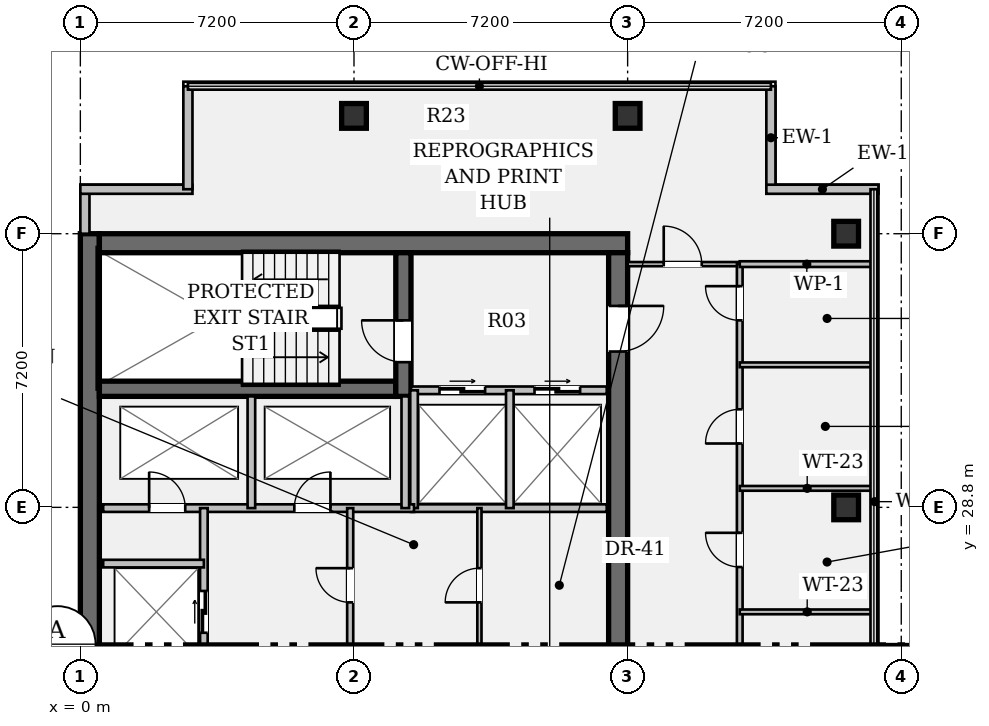
"""IFC4 building model, lengths in metres.
Left out: names, types, materials, properties, quantities, classifications, styles, units other than length and angle.
Written with IfcOpenShell. Run it as: python <this file> out.ifc"""

import sys

from ifc_helpers import new_model, si_unit, direction, frame, frame_2d, origin, origin_2d, place, context, subcontext, project, spatial, rectangle, hollow_rectangle, extrude, element, fill, save


model = new_model("IFC4")
c1 = context("Model", 3, precision=1e-05, world=origin(), true_north=direction((0.0, 1.0)))
c2 = subcontext(c1, "Body", "Model", "MODEL_VIEW")
j1 = project(units=[si_unit("LENGTHUNIT", "METRE"), si_unit("PLANEANGLEUNIT", "RADIAN")], contexts=[c1])
p1 = place(None, origin())
s1 = spatial("IfcSite", under=j1, at=p1, CompositionType="ELEMENT")
p2 = place(p1, origin())
s2 = spatial("IfcBuilding", under=s1, at=p2, CompositionType="ELEMENT")
p3 = place(p2, frame((0.0, 0.0, 286.65)))
s3 = spatial("IfcBuildingStorey", under=s2, at=p3, CompositionType="ELEMENT", Elevation=286.65)
p4 = place(p3, frame((0.25, 7.2, 0.0), z_axis=(0.0, 0.0, 1.0), x_axis=(0.0, 1.0, 0.0)))
e1 = element("IfcWall", 1, at=p4, inside=s3, PredefinedType="SHEAR", context=c2, shape_type="SweptSolid", body=[
    extrude(rectangle(XDim=28.8, YDim=0.5, at=frame_2d((14.4, 0.0))), origin(), (0.0, 0.0, 1.0), 3.24),
])
p5 = place(p3, frame((0.5, 35.75, 0.0), z_axis=(0.0, 0.0, 1.0), x_axis=(1.0, 0.0, 0.0)))
e2 = element("IfcWall", 2, at=p5, inside=s3, PredefinedType="SHEAR", context=c2, shape_type="SweptSolid", body=[
    extrude(rectangle(XDim=13.9, YDim=0.5, at=frame_2d((6.95, 0.0))), origin(), (0.0, 0.0, 1.0), 3.24),
])
p6 = place(p3, frame((14.15, 35.5, 0.0), z_axis=(0.0, 0.0, 1.0), x_axis=(0.0, -1.0, 0.0)))
e3 = element("IfcWall", 3, at=p6, inside=s3, PredefinedType="SHEAR", context=c2, shape_type="SweptSolid", body=[
    extrude(rectangle(XDim=27.8, YDim=0.5, at=frame_2d((13.9, 0.0))), origin(), (0.0, 0.0, 1.0), 3.24),
])
p7 = place(p6, frame((1.4, 0.0, 0.0)))
e4 = element("IfcOpeningElement", 4, at=p7, cuts=e3, PredefinedType="OPENING", context=c2, shape_type="SweptSolid", body=[
    extrude(rectangle(XDim=1.2, YDim=2.15, at=frame_2d((0.6, 1.075))), frame((0.0, 0.262, 0.0), z_axis=(0.0, -1.0, 0.0), x_axis=(1.0, 0.0, 0.0)), (0.0, 0.0, 1.0), 0.524),
])
p8 = place(p6, frame((25.35, 0.0, 0.0)))
e5 = element("IfcOpeningElement", 5, at=p8, cuts=e3, PredefinedType="OPENING", context=c2, shape_type="SweptSolid", body=[
    extrude(rectangle(XDim=1.2, YDim=2.15, at=frame_2d((0.6, 1.075))), frame((0.0, 0.262, 0.0), z_axis=(0.0, -1.0, 0.0), x_axis=(1.0, 0.0, 0.0)), (0.0, 0.0, 1.0), 0.524),
])
p9 = place(p6, frame((14.7, 0.0, 0.0)))
e6 = element("IfcOpeningElement", 6, at=p9, cuts=e3, PredefinedType="OPENING", context=c2, shape_type="SweptSolid", body=[
    extrude(rectangle(XDim=1.6, YDim=2.2, at=frame_2d((0.8, 1.1))), frame((0.0, 0.262, 0.0), z_axis=(0.0, -1.0, 0.0), x_axis=(1.0, 0.0, 0.0)), (0.0, 0.0, 1.0), 0.524),
])
p10 = place(p3, frame((0.5, 31.92, 0.0), z_axis=(0.0, 0.0, 1.0), x_axis=(1.0, 0.0, 0.0)))
e7 = element("IfcWall", 7, at=p10, inside=s3, PredefinedType="SHEAR", context=c2, shape_type="SweptSolid", body=[
    extrude(rectangle(XDim=7.8, YDim=0.4, at=frame_2d((3.9, 0.0))), origin(), (0.0, 0.0, 1.0), 3.24),
])
p11 = place(p3, frame((8.5, 31.72, 0.0), z_axis=(0.0, 0.0, 1.0), x_axis=(0.0, 1.0, 0.0)))
e8 = element("IfcWall", 8, at=p11, inside=s3, PredefinedType="SHEAR", context=c2, shape_type="SweptSolid", body=[
    extrude(rectangle(XDim=3.78, YDim=0.4, at=frame_2d((1.89, 0.0))), origin(), (0.0, 0.0, 1.0), 3.24),
])
p12 = place(p11, frame((0.9, 0.0, 0.0)))
e9 = element("IfcOpeningElement", 9, at=p12, cuts=e8, PredefinedType="OPENING", context=c2, shape_type="SweptSolid", body=[
    extrude(rectangle(XDim=1.1, YDim=2.15, at=frame_2d((0.55, 1.075))), frame((0.0, 0.212, 0.0), z_axis=(0.0, -1.0, 0.0), x_axis=(1.0, 0.0, 0.0)), (0.0, 0.0, 1.0), 0.424),
])
for number, where, z_axis, x_axis in (
    (10, (7.2, 39.1, 0.0), (0.0, 0.0, 1.0), (1.0, 0.0, 0.0)),
    (11, (14.4, 39.1, 0.0), (0.0, 0.0, 1.0), (1.0, 0.0, 0.0)),
    (12, (20.15, 28.8, 0.0), (0.0, 0.0, 1.0), (1.0, 0.0, 0.0)),
    (13, (20.15, 36.0, 0.0), (0.0, 0.0, 1.0), (1.0, 0.0, 0.0)),
):
    element("IfcColumn", number, at=place(p3, frame(where, z_axis=z_axis, x_axis=x_axis)), inside=s3, PredefinedType="COLUMN", context=c2, shape_type="SweptSolid", body=[
        extrude(hollow_rectangle(XDim=0.65, YDim=0.65, WallThickness=0.04, at=origin_2d()), origin(), (0.0, 0.0, 1.0), 3.24),
    ])
p13 = place(p3, frame((0.12, 36.0, 0.0), z_axis=(0.0, 0.0, 1.0), x_axis=(0.0, 1.0, 0.0)))
e14 = element("IfcWall", 14, at=p13, inside=s3, PredefinedType="STANDARD", context=c2, shape_type="SweptSolid", body=[
    extrude(rectangle(XDim=1.17, YDim=0.24, at=frame_2d((0.585, 0.0))), origin(), (0.0, 0.0, 1.0), 3.24),
])
p14 = place(p3, frame((0.0, 37.17, 0.0), z_axis=(0.0, 0.0, 1.0), x_axis=(1.0, 0.0, 0.0)))
e15 = element("IfcWall", 15, at=p14, inside=s3, PredefinedType="STANDARD", context=c2, shape_type="SweptSolid", body=[
    extrude(rectangle(XDim=2.95, YDim=0.24, at=frame_2d((1.475, 0.0))), origin(), (0.0, 0.0, 1.0), 3.24),
])
for number, where, z_axis, x_axis in (
    (16, (2.83, 37.17, 0.0), (0.0, 0.0, 1.0), (0.0, 1.0, 0.0)),
    (17, (18.17, 39.88, 0.0), (0.0, 0.0, 1.0), (0.0, -1.0, 0.0)),
):
    element("IfcWall", number, at=place(p3, frame(where, z_axis=z_axis, x_axis=x_axis)), inside=s3, PredefinedType="STANDARD", context=c2, shape_type="SweptSolid", body=[
        extrude(rectangle(XDim=2.71, YDim=0.24, at=frame_2d((1.355, 0.0))), origin(), (0.0, 0.0, 1.0), 3.24),
    ])
p15 = place(p3, frame((18.05, 37.17, 0.0), z_axis=(0.0, 0.0, 1.0), x_axis=(1.0, 0.0, 0.0)))
e18 = element("IfcWall", 18, at=p15, inside=s3, PredefinedType="STANDARD", context=c2, shape_type="SweptSolid", body=[
    extrude(rectangle(XDim=2.95, YDim=0.24, at=frame_2d((1.475, 0.0))), origin(), (0.0, 0.0, 1.0), 3.24),
])
p16 = place(p3, frame((8.7, 31.88, 0.0), z_axis=(0.0, 0.0, 1.0), x_axis=(1.0, 0.0, 0.0)))
e19 = element("IfcWall", 19, at=p16, inside=s3, PredefinedType="PARTITIONING", context=c2, shape_type="SweptSolid", body=[
    extrude(rectangle(XDim=5.15, YDim=0.2, at=frame_2d((2.575, 0.0))), origin(), (0.0, 0.0, 1.0), 3.24),
])
p17 = place(p16, frame((0.75, 0.0, 0.0)))
e20 = element("IfcOpeningElement", 20, at=p17, cuts=e19, PredefinedType="OPENING", context=c2, shape_type="SweptSolid", body=[
    extrude(rectangle(XDim=1.2, YDim=2.2, at=frame_2d((0.6, 1.1))), frame((0.0, 0.112, 0.0), z_axis=(0.0, -1.0, 0.0), x_axis=(1.0, 0.0, 0.0)), (0.0, 0.0, 1.0), 0.224),
])
p18 = place(p16, frame((3.25, 0.0, 0.0)))
e21 = element("IfcOpeningElement", 21, at=p18, cuts=e19, PredefinedType="OPENING", context=c2, shape_type="SweptSolid", body=[
    extrude(rectangle(XDim=1.2, YDim=2.2, at=frame_2d((0.6, 1.1))), frame((0.0, 0.112, 0.0), z_axis=(0.0, -1.0, 0.0), x_axis=(1.0, 0.0, 0.0)), (0.0, 0.0, 1.0), 0.224),
])
p19 = place(p3, frame((8.7, 28.78, 0.0), z_axis=(0.0, 0.0, 1.0), x_axis=(1.0, 0.0, 0.0)))
e22 = element("IfcWall", 22, at=p19, inside=s3, PredefinedType="PARTITIONING", context=c2, shape_type="SweptSolid", body=[
    extrude(rectangle(XDim=5.15, YDim=0.2, at=frame_2d((2.575, 0.0))), origin(), (0.0, 0.0, 1.0), 3.24),
])
for number, where, z_axis, x_axis in (
    (23, (8.78, 28.78, 0.0), (0.0, 0.0, 1.0), (0.0, 1.0, 0.0)),
    (24, (11.3, 28.78, 0.0), (0.0, 0.0, 1.0), (0.0, 1.0, 0.0)),
):
    element("IfcWall", number, at=place(p3, frame(where, z_axis=z_axis, x_axis=x_axis)), inside=s3, PredefinedType="PARTITIONING", context=c2, shape_type="SweptSolid", body=[
        extrude(rectangle(XDim=3.1, YDim=0.2, at=frame_2d((1.55, 0.0))), origin(), (0.0, 0.0, 1.0), 3.24),
    ])
p20 = place(p3, frame((0.6, 28.78, 0.0), z_axis=(0.0, 0.0, 1.0), x_axis=(1.0, 0.0, 0.0)))
e25 = element("IfcWall", 25, at=p20, inside=s3, PredefinedType="PARTITIONING", context=c2, shape_type="SweptSolid", body=[
    extrude(rectangle(XDim=8.18, YDim=0.2, at=frame_2d((4.09, 0.0))), origin(), (0.0, 0.0, 1.0), 3.24),
])
p21 = place(p20, frame((1.21, 0.0, 0.0)))
e26 = element("IfcOpeningElement", 26, at=p21, cuts=e25, PredefinedType="OPENING", context=c2, shape_type="SweptSolid", body=[
    extrude(rectangle(XDim=0.95, YDim=2.15, at=frame_2d((0.475, 1.075))), frame((0.0, 0.112, 0.0), z_axis=(0.0, -1.0, 0.0), x_axis=(1.0, 0.0, 0.0)), (0.0, 0.0, 1.0), 0.224),
])
p22 = place(p20, frame((5.03, 0.0, 0.0)))
e27 = element("IfcOpeningElement", 27, at=p22, cuts=e25, PredefinedType="OPENING", context=c2, shape_type="SweptSolid", body=[
    extrude(rectangle(XDim=0.95, YDim=2.15, at=frame_2d((0.475, 1.075))), frame((0.0, 0.112, 0.0), z_axis=(0.0, -1.0, 0.0), x_axis=(1.0, 0.0, 0.0)), (0.0, 0.0, 1.0), 0.224),
])
for number, where, z_axis, x_axis in (
    (28, (4.5, 28.78, 0.0), (0.0, 0.0, 1.0), (0.0, 1.0, 0.0)),
    (29, (8.55, 28.78, 0.0), (0.0, 0.0, 1.0), (0.0, 1.0, 0.0)),
):
    element("IfcWall", number, at=place(p3, frame(where, z_axis=z_axis, x_axis=x_axis)), inside=s3, PredefinedType="PARTITIONING", context=c2, shape_type="SweptSolid", body=[
        extrude(rectangle(XDim=2.94, YDim=0.2, at=frame_2d((1.47, 0.0))), origin(), (0.0, 0.0, 1.0), 3.24),
    ])
p23 = place(p3, frame((3.25, 15.7, 0.0), z_axis=(0.0, 0.0, 1.0), x_axis=(0.0, 1.0, 0.0)))
e30 = element("IfcWall", 30, at=p23, inside=s3, PredefinedType="PARTITIONING", context=c2, shape_type="SweptSolid", body=[
    extrude(rectangle(XDim=13.08, YDim=0.2, at=frame_2d((6.54, 0.0))), origin(), (0.0, 0.0, 1.0), 3.24),
])
p24 = place(p23, frame((0.9, 0.0, 0.0)))
e31 = element("IfcOpeningElement", 31, at=p24, cuts=e30, PredefinedType="OPENING", context=c2, shape_type="SweptSolid", body=[
    extrude(rectangle(XDim=1.1, YDim=2.2, at=frame_2d((0.55, 1.1))), frame((0.0, 0.112, 0.0), z_axis=(0.0, -1.0, 0.0), x_axis=(1.0, 0.0, 0.0)), (0.0, 0.0, 1.0), 0.224),
])
p25 = place(p23, frame((3.5, 0.0, 0.0)))
e32 = element("IfcOpeningElement", 32, at=p25, cuts=e30, PredefinedType="OPENING", context=c2, shape_type="SweptSolid", body=[
    extrude(rectangle(XDim=1.1, YDim=2.2, at=frame_2d((0.55, 1.1))), frame((0.0, 0.112, 0.0), z_axis=(0.0, -1.0, 0.0), x_axis=(1.0, 0.0, 0.0)), (0.0, 0.0, 1.0), 0.224),
])
p26 = place(p23, frame((7.2, 0.0, 0.0)))
e33 = element("IfcOpeningElement", 33, at=p26, cuts=e30, PredefinedType="OPENING", context=c2, shape_type="SweptSolid", body=[
    extrude(rectangle(XDim=1.1, YDim=2.2, at=frame_2d((0.55, 1.1))), frame((0.0, 0.112, 0.0), z_axis=(0.0, -1.0, 0.0), x_axis=(1.0, 0.0, 0.0)), (0.0, 0.0, 1.0), 0.224),
])
p27 = place(p23, frame((9.8, 0.0, 0.0)))
e34 = element("IfcOpeningElement", 34, at=p27, cuts=e30, PredefinedType="OPENING", context=c2, shape_type="SweptSolid", body=[
    extrude(rectangle(XDim=1.1, YDim=2.2, at=frame_2d((0.55, 1.1))), frame((0.0, 0.112, 0.0), z_axis=(0.0, -1.0, 0.0), x_axis=(1.0, 0.0, 0.0)), (0.0, 0.0, 1.0), 0.224),
])
p28 = place(p3, frame((0.6, 27.32, 0.0), z_axis=(0.0, 0.0, 1.0), x_axis=(1.0, 0.0, 0.0)))
e35 = element("IfcWall", 35, at=p28, inside=s3, PredefinedType="PARTITIONING", context=c2, shape_type="SweptSolid", body=[
    extrude(rectangle(XDim=2.65, YDim=0.2, at=frame_2d((1.325, 0.0))), origin(), (0.0, 0.0, 1.0), 3.24),
])
p29 = place(p3, frame((7.1, 22.2, 0.0), z_axis=(0.0, 0.0, 1.0), x_axis=(0.0, 1.0, 0.0)))
e36 = element("IfcWall", 36, at=p29, inside=s3, PredefinedType="PARTITIONING", context=c2, shape_type="SweptSolid", body=[
    extrude(rectangle(XDim=6.58, YDim=0.16, at=frame_2d((3.29, 0.0))), origin(), (0.0, 0.0, 1.0), 3.24),
])
p30 = place(p29, frame((4.1, 0.0, 0.0)))
e37 = element("IfcOpeningElement", 37, at=p30, cuts=e36, PredefinedType="OPENING", context=c2, shape_type="SweptSolid", body=[
    extrude(rectangle(XDim=0.9, YDim=2.15, at=frame_2d((0.45, 1.075))), frame((0.0, 0.092, 0.0), z_axis=(0.0, -1.0, 0.0), x_axis=(1.0, 0.0, 0.0)), (0.0, 0.0, 1.0), 0.184),
])
p31 = place(p3, frame((10.5, 25.0, 0.0), z_axis=(0.0, 0.0, 1.0), x_axis=(0.0, 1.0, 0.0)))
e38 = element("IfcWall", 38, at=p31, inside=s3, PredefinedType="PARTITIONING", context=c2, shape_type="SweptSolid", body=[
    extrude(rectangle(XDim=3.78, YDim=0.11, at=frame_2d((1.89, 0.0))), origin(), (0.0, 0.0, 1.0), 3.24),
])
p32 = place(p31, frame((1.3, 0.0, 0.0)))
e39 = element("IfcOpeningElement", 39, at=p32, cuts=e38, PredefinedType="OPENING", context=c2, shape_type="SweptSolid", body=[
    extrude(rectangle(XDim=0.9, YDim=2.15, at=frame_2d((0.45, 1.075))), frame((0.0, 0.067, 0.0), z_axis=(0.0, -1.0, 0.0), x_axis=(1.0, 0.0, 0.0)), (0.0, 0.0, 1.0), 0.134),
])
p33 = place(p3, frame((14.4, 35.2, 0.0), z_axis=(0.0, 0.0, 1.0), x_axis=(1.0, 0.0, 0.0)))
e40 = element("IfcWall", 40, at=p33, inside=s3, PredefinedType="PARTITIONING", context=c2, shape_type="SweptSolid", body=[
    extrude(rectangle(XDim=2.95, YDim=0.11, at=frame_2d((1.475, 0.0))), origin(), (0.0, 0.0, 1.0), 2.808),
])
p34 = place(p33, frame((0.95, 0.0, 0.0)))
e41 = element("IfcOpeningElement", 41, at=p34, cuts=e40, PredefinedType="OPENING", context=c2, shape_type="SweptSolid", body=[
    extrude(rectangle(XDim=1.0, YDim=2.15, at=frame_2d((0.5, 1.075))), frame((0.0, 0.067, 0.0), z_axis=(0.0, -1.0, 0.0), x_axis=(1.0, 0.0, 0.0)), (0.0, 0.0, 1.0), 0.134),
])
p35 = place(p3, frame((17.35, 12.55, 0.0), z_axis=(0.0, 0.0, 1.0), x_axis=(0.0, 1.0, 0.0)))
e42 = element("IfcWall", 42, at=p35, inside=s3, PredefinedType="PARTITIONING", context=c2, shape_type="SweptSolid", body=[
    extrude(rectangle(XDim=22.65, YDim=0.15, at=frame_2d((11.325, 0.0))), origin(), (0.0, 0.0, 1.0), 2.676),
])
p36 = place(p35, frame((11.43, 0.0, 0.0)))
e43 = element("IfcOpeningElement", 43, at=p36, cuts=e42, PredefinedType="OPENING", context=c2, shape_type="SweptSolid", body=[
    extrude(rectangle(XDim=0.9, YDim=2.15, at=frame_2d((0.45, 1.075))), frame((0.0, 0.087, 0.0), z_axis=(0.0, -1.0, 0.0), x_axis=(1.0, 0.0, 0.0)), (0.0, 0.0, 1.0), 0.174),
])
p37 = place(p35, frame((14.68, 0.0, 0.0)))
e44 = element("IfcOpeningElement", 44, at=p37, cuts=e42, PredefinedType="OPENING", context=c2, shape_type="SweptSolid", body=[
    extrude(rectangle(XDim=0.9, YDim=2.15, at=frame_2d((0.45, 1.075))), frame((0.0, 0.087, 0.0), z_axis=(0.0, -1.0, 0.0), x_axis=(1.0, 0.0, 0.0)), (0.0, 0.0, 1.0), 0.174),
])
p38 = place(p35, frame((17.93, 0.0, 0.0)))
e45 = element("IfcOpeningElement", 45, at=p38, cuts=e42, PredefinedType="OPENING", context=c2, shape_type="SweptSolid", body=[
    extrude(rectangle(XDim=0.9, YDim=2.15, at=frame_2d((0.45, 1.075))), frame((0.0, 0.087, 0.0), z_axis=(0.0, -1.0, 0.0), x_axis=(1.0, 0.0, 0.0)), (0.0, 0.0, 1.0), 0.174),
])
p39 = place(p35, frame((21.17, 0.0, 0.0)))
e46 = element("IfcOpeningElement", 46, at=p39, cuts=e42, PredefinedType="OPENING", context=c2, shape_type="SweptSolid", body=[
    extrude(rectangle(XDim=0.9, YDim=2.15, at=frame_2d((0.45, 1.075))), frame((0.0, 0.087, 0.0), z_axis=(0.0, -1.0, 0.0), x_axis=(1.0, 0.0, 0.0)), (0.0, 0.0, 1.0), 0.174),
])
p40 = place(p3, frame((17.35, 35.2, 0.0), z_axis=(0.0, 0.0, 1.0), x_axis=(1.0, 0.0, 0.0)))
e47 = element("IfcWall", 47, at=p40, inside=s3, PredefinedType="PARTITIONING", context=c2, shape_type="SweptSolid", body=[
    extrude(rectangle(XDim=3.53, YDim=0.15, at=frame_2d((1.765, 0.0))), origin(), (0.0, 0.0, 1.0), 2.808),
])
p41 = place(p3, frame((20.9, 22.7, 0.0), z_axis=(0.0, 0.0, 1.0), x_axis=(0.0, 1.0, 0.0)))
e48 = element("IfcWall", 48, at=p41, inside=s3, PredefinedType="PARTITIONING", context=c2, shape_type="SweptSolid", body=[
    extrude(rectangle(XDim=12.5, YDim=0.11, at=frame_2d((6.25, 0.0))), origin(), (0.0, 0.0, 1.0), 3.24),
])
for number, where, z_axis, x_axis in (
    (49, (17.35, 26.05, 0.0), (0.0, 0.0, 1.0), (1.0, 0.0, 0.0)),
    (50, (17.35, 29.3, 0.0), (0.0, 0.0, 1.0), (1.0, 0.0, 0.0)),
    (51, (17.35, 32.55, 0.0), (0.0, 0.0, 1.0), (1.0, 0.0, 0.0)),
):
    element("IfcWall", number, at=place(p3, frame(where, z_axis=z_axis, x_axis=x_axis)), inside=s3, PredefinedType="PARTITIONING", context=c2, shape_type="SweptSolid", body=[
        extrude(rectangle(XDim=3.55, YDim=0.125, at=frame_2d((1.775, 0.0))), origin(), (0.0, 0.0, 1.0), 2.808),
    ])
p42 = place(p12, origin())
e52 = element("IfcDoor", 52, at=p42, inside=s3, OperationType="SINGLE_SWING_RIGHT", PredefinedType="DOOR", context=c2, shape_type="SweptSolid", body=[
    extrude(rectangle(XDim=1.1, YDim=2.15, at=frame_2d((0.55, 1.075))), frame((0.0, 0.025, 0.0), z_axis=(0.0, -1.0, 0.0), x_axis=(1.0, 0.0, 0.0)), (0.0, 0.0, 1.0), 0.05),
])
fill(e9, e52)
p43 = place(p7, origin())
e53 = element("IfcDoor", 53, at=p43, inside=s3, OperationType="SINGLE_SWING_LEFT", PredefinedType="DOOR", context=c2, shape_type="SweptSolid", body=[
    extrude(rectangle(XDim=1.2, YDim=2.15, at=frame_2d((0.6, 1.075))), frame((0.0, 0.025, 0.0), z_axis=(0.0, -1.0, 0.0), x_axis=(1.0, 0.0, 0.0)), (0.0, 0.0, 1.0), 0.05),
])
fill(e4, e53)
p44 = place(p17, origin())
e54 = element("IfcDoor", 54, at=p44, inside=s3, OperationType="DOUBLE_DOOR_SLIDING", PredefinedType="DOOR", context=c2, shape_type="SweptSolid", body=[
    extrude(rectangle(XDim=1.2, YDim=2.2, at=frame_2d((0.6, 1.1))), frame((0.0, 0.025, 0.0), z_axis=(0.0, -1.0, 0.0), x_axis=(1.0, 0.0, 0.0)), (0.0, 0.0, 1.0), 0.05),
])
fill(e20, e54)
p45 = place(p18, origin())
e55 = element("IfcDoor", 55, at=p45, inside=s3, OperationType="DOUBLE_DOOR_SLIDING", PredefinedType="DOOR", context=c2, shape_type="SweptSolid", body=[
    extrude(rectangle(XDim=1.2, YDim=2.2, at=frame_2d((0.6, 1.1))), frame((0.0, 0.025, 0.0), z_axis=(0.0, -1.0, 0.0), x_axis=(1.0, 0.0, 0.0)), (0.0, 0.0, 1.0), 0.05),
])
fill(e21, e55)
p46 = place(p21, origin())
e56 = element("IfcDoor", 56, at=p46, inside=s3, OperationType="SINGLE_SWING_LEFT", PredefinedType="DOOR", context=c2, shape_type="SweptSolid", body=[
    extrude(rectangle(XDim=0.95, YDim=2.15, at=frame_2d((0.475, 1.075))), frame((0.0, 0.025, 0.0), z_axis=(0.0, -1.0, 0.0), x_axis=(1.0, 0.0, 0.0)), (0.0, 0.0, 1.0), 0.05),
])
fill(e26, e56)
p47 = place(p22, origin())
e57 = element("IfcDoor", 57, at=p47, inside=s3, OperationType="SINGLE_SWING_RIGHT", PredefinedType="DOOR", context=c2, shape_type="SweptSolid", body=[
    extrude(rectangle(XDim=0.95, YDim=2.15, at=frame_2d((0.475, 1.075))), frame((0.0, 0.025, 0.0), z_axis=(0.0, -1.0, 0.0), x_axis=(1.0, 0.0, 0.0)), (0.0, 0.0, 1.0), 0.05),
])
fill(e27, e57)
p48 = place(p27, origin())
e58 = element("IfcDoor", 58, at=p48, inside=s3, OperationType="DOUBLE_DOOR_SLIDING", PredefinedType="DOOR", context=c2, shape_type="SweptSolid", body=[
    extrude(rectangle(XDim=1.1, YDim=2.2, at=frame_2d((0.55, 1.1))), frame((0.0, 0.025, 0.0), z_axis=(0.0, -1.0, 0.0), x_axis=(1.0, 0.0, 0.0)), (0.0, 0.0, 1.0), 0.05),
])
fill(e34, e58)
p49 = place(p30, origin())
e59 = element("IfcDoor", 59, at=p49, inside=s3, OperationType="SINGLE_SWING_RIGHT", PredefinedType="DOOR", context=c2, shape_type="SweptSolid", body=[
    extrude(rectangle(XDim=0.9, YDim=2.15, at=frame_2d((0.45, 1.075))), frame((0.0, 0.025, 0.0), z_axis=(0.0, -1.0, 0.0), x_axis=(1.0, 0.0, 0.0)), (0.0, 0.0, 1.0), 0.05),
])
fill(e37, e59)
p50 = place(p32, origin())
e60 = element("IfcDoor", 60, at=p50, inside=s3, OperationType="SINGLE_SWING_LEFT", PredefinedType="DOOR", context=c2, shape_type="SweptSolid", body=[
    extrude(rectangle(XDim=0.9, YDim=2.15, at=frame_2d((0.45, 1.075))), frame((0.0, 0.025, 0.0), z_axis=(0.0, -1.0, 0.0), x_axis=(1.0, 0.0, 0.0)), (0.0, 0.0, 1.0), 0.05),
])
fill(e39, e60)
p51 = place(p34, origin())
e61 = element("IfcDoor", 61, at=p51, inside=s3, OperationType="SINGLE_SWING_LEFT", PredefinedType="DOOR", context=c2, shape_type="SweptSolid", body=[
    extrude(rectangle(XDim=1.0, YDim=2.15, at=frame_2d((0.5, 1.075))), frame((0.0, 0.025, 0.0), z_axis=(0.0, -1.0, 0.0), x_axis=(1.0, 0.0, 0.0)), (0.0, 0.0, 1.0), 0.05),
])
fill(e41, e61)
p52 = place(p37, origin())
e62 = element("IfcDoor", 62, at=p52, inside=s3, OperationType="SINGLE_SWING_RIGHT", PredefinedType="DOOR", context=c2, shape_type="SweptSolid", body=[
    extrude(rectangle(XDim=0.9, YDim=2.15, at=frame_2d((0.45, 1.075))), frame((0.0, 0.025, 0.0), z_axis=(0.0, -1.0, 0.0), x_axis=(1.0, 0.0, 0.0)), (0.0, 0.0, 1.0), 0.05),
])
fill(e44, e62)
p53 = place(p38, origin())
e63 = element("IfcDoor", 63, at=p53, inside=s3, OperationType="SINGLE_SWING_LEFT", PredefinedType="DOOR", context=c2, shape_type="SweptSolid", body=[
    extrude(rectangle(XDim=0.9, YDim=2.15, at=frame_2d((0.45, 1.075))), frame((0.0, 0.025, 0.0), z_axis=(0.0, -1.0, 0.0), x_axis=(1.0, 0.0, 0.0)), (0.0, 0.0, 1.0), 0.05),
])
fill(e45, e63)
p54 = place(p39, origin())
e64 = element("IfcDoor", 64, at=p54, inside=s3, OperationType="SINGLE_SWING_RIGHT", PredefinedType="DOOR", context=c2, shape_type="SweptSolid", body=[
    extrude(rectangle(XDim=0.9, YDim=2.15, at=frame_2d((0.45, 1.075))), frame((0.0, 0.025, 0.0), z_axis=(0.0, -1.0, 0.0), x_axis=(1.0, 0.0, 0.0)), (0.0, 0.0, 1.0), 0.05),
])
fill(e46, e64)
save(model, sys.argv[1])
